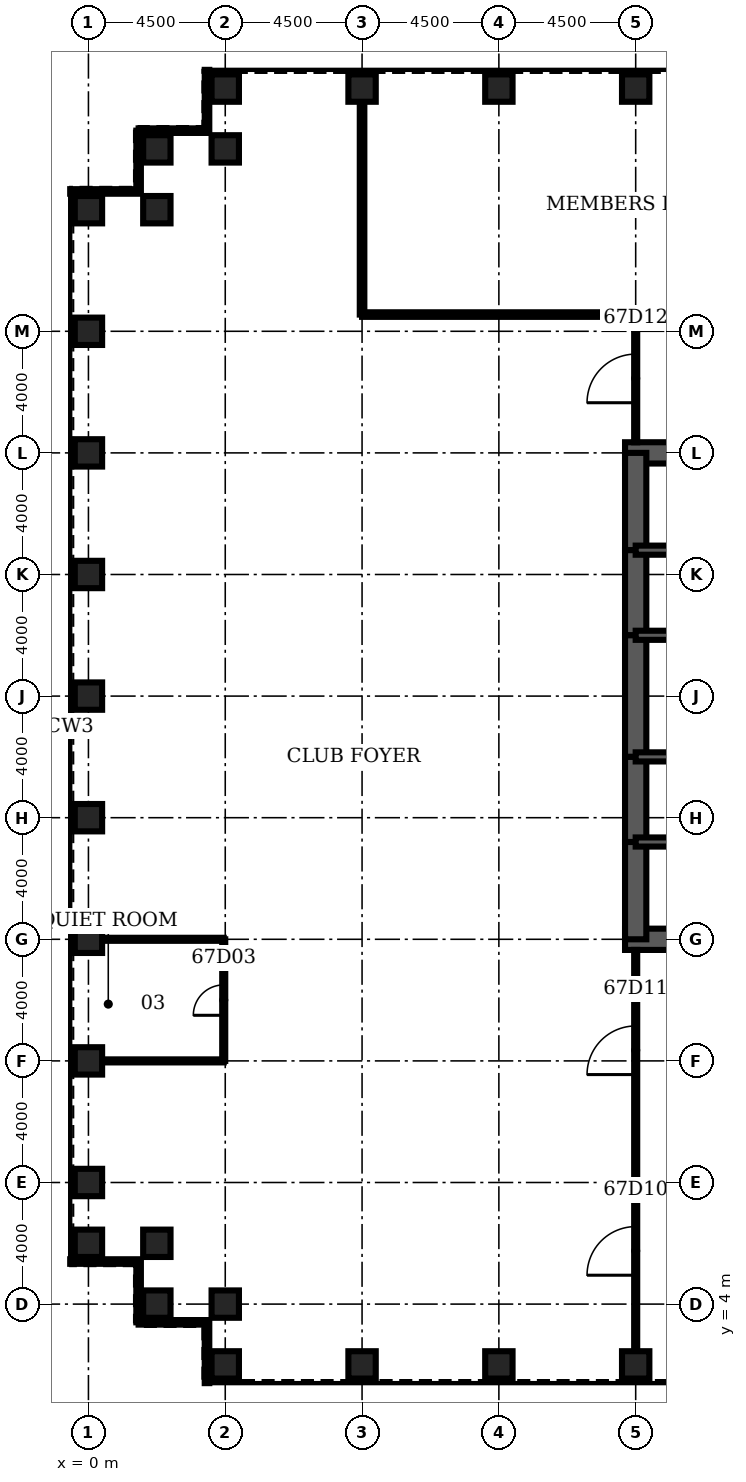
"""IFC4 building model, lengths in metres.
Left out: names, types, materials, properties, quantities, classifications, styles, units other than length and angle.
Written with IfcOpenShell. Run it as: python <this file> out.ifc"""

import sys

from ifc_helpers import new_model, si_unit, direction, frame, frame_2d, origin, origin_2d, place, context, subcontext, project, spatial, rectangle, hollow_rectangle, extrude, element, fill, save


model = new_model("IFC4")
c1 = context("Model", 3, precision=1e-05, world=origin(), true_north=direction((0.0, 1.0)))
c2 = subcontext(c1, "Body", "Model", "MODEL_VIEW")
j1 = project(units=[si_unit("LENGTHUNIT", "METRE"), si_unit("PLANEANGLEUNIT", "RADIAN")], contexts=[c1])
p1 = place(None, origin())
s1 = spatial("IfcSite", under=j1, at=p1, CompositionType="ELEMENT")
p2 = place(p1, origin())
s2 = spatial("IfcBuilding", under=s1, at=p2, CompositionType="ELEMENT")
p3 = place(p2, frame((0.0, 0.0, 296.3)))
s3 = spatial("IfcBuildingStorey", under=s2, at=p3, CompositionType="ELEMENT", Elevation=296.3)
for number, where, z_axis, x_axis in (
    (1, (4.5, 2.0, 0.0), (0.0, 0.0, 1.0), (0.0, 1.0, 0.0)),
    (2, (9.0, 2.0, 0.0), (0.0, 0.0, 1.0), (0.0, 1.0, 0.0)),
    (3, (13.5, 2.0, 0.0), (0.0, 0.0, 1.0), (0.0, 1.0, 0.0)),
    (4, (18.0, 2.0, 0.0), (0.0, 0.0, 1.0), (0.0, 1.0, 0.0)),
    (5, (18.0, 44.0, 0.0), (0.0, 0.0, 1.0), (0.0, 1.0, 0.0)),
    (6, (13.5, 44.0, 0.0), (0.0, 0.0, 1.0), (0.0, 1.0, 0.0)),
    (7, (9.0, 44.0, 0.0), (0.0, 0.0, 1.0), (0.0, 1.0, 0.0)),
    (8, (4.5, 44.0, 0.0), (0.0, 0.0, 1.0), (0.0, 1.0, 0.0)),
    (9, (4.5, 42.0, 0.0), (0.0, 0.0, 1.0), (0.0, 1.0, 0.0)),
    (10, (2.25, 42.0, 0.0), (0.0, 0.0, 1.0), (1.0, 0.0, 0.0)),
    (11, (2.25, 40.0, 0.0), (0.0, 0.0, 1.0), (1.0, 0.0, 0.0)),
    (12, (0.0, 40.0, 0.0), (0.0, 0.0, 1.0), (1.0, 0.0, 0.0)),
    (13, (0.0, 36.0, 0.0), (0.0, 0.0, 1.0), (1.0, 0.0, 0.0)),
    (14, (0.0, 32.0, 0.0), (0.0, 0.0, 1.0), (1.0, 0.0, 0.0)),
    (15, (0.0, 28.0, 0.0), (0.0, 0.0, 1.0), (1.0, 0.0, 0.0)),
    (16, (0.0, 24.0, 0.0), (0.0, 0.0, 1.0), (1.0, 0.0, 0.0)),
    (17, (0.0, 20.0, 0.0), (0.0, 0.0, 1.0), (1.0, 0.0, 0.0)),
    (18, (0.0, 16.0, 0.0), (0.0, 0.0, 1.0), (1.0, 0.0, 0.0)),
    (19, (0.0, 12.0, 0.0), (0.0, 0.0, 1.0), (1.0, 0.0, 0.0)),
    (20, (0.0, 8.0, 0.0), (0.0, 0.0, 1.0), (1.0, 0.0, 0.0)),
    (21, (0.0, 6.0, 0.0), (0.0, 0.0, 1.0), (1.0, 0.0, 0.0)),
    (22, (2.25, 6.0, 0.0), (0.0, 0.0, 1.0), (1.0, 0.0, 0.0)),
    (23, (2.25, 4.0, 0.0), (0.0, 0.0, 1.0), (1.0, 0.0, 0.0)),
    (24, (4.5, 4.0, 0.0), (0.0, 0.0, 1.0), (0.0, 1.0, 0.0)),
):
    element("IfcColumn", number, at=place(p3, frame(where, z_axis=z_axis, x_axis=x_axis)), inside=s3, PredefinedType="COLUMN", context=c2, shape_type="SweptSolid", body=[
        extrude(hollow_rectangle(XDim=0.9, YDim=0.9, WallThickness=0.06, at=origin_2d()), origin(), (0.0, 0.0, 1.0), 4.2),
    ])
for number, where, z_axis, x_axis in (
    (25, (17.65, 16.0, 0.0), (0.0, 0.0, 1.0), (1.0, 0.0, 0.0)),
    (26, (27.0, 32.0, 0.0), (0.0, 0.0, 1.0), (-1.0, 0.0, 0.0)),
):
    element("IfcWall", number, at=place(p3, frame(where, z_axis=z_axis, x_axis=x_axis)), inside=s3, PredefinedType="SHEAR", context=c2, shape_type="SweptSolid", body=[
        extrude(rectangle(XDim=9.35, YDim=0.7, at=frame_2d((4.675, 0.0))), origin(), (0.0, 0.0, 1.0), 4.2),
    ])
p4 = place(p3, frame((18.0, 32.0, 0.0), z_axis=(0.0, 0.0, 1.0), x_axis=(0.0, -1.0, 0.0)))
e27 = element("IfcWall", 27, at=p4, inside=s3, PredefinedType="SHEAR", context=c2, shape_type="SweptSolid", body=[
    extrude(rectangle(XDim=3.2, YDim=0.7, at=frame_2d((1.6, 0.0))), origin(), (0.0, 0.0, 1.0), 4.2),
])
p5 = place(p3, frame((18.0, 28.8, 0.0), z_axis=(0.0, 0.0, 1.0), x_axis=(0.0, -1.0, 0.0)))
e28 = element("IfcWall", 28, at=p5, inside=s3, PredefinedType="SHEAR", context=c2, shape_type="SweptSolid", body=[
    extrude(rectangle(XDim=2.8, YDim=0.7, at=frame_2d((1.4, 0.0))), origin(), (0.0, 0.0, 1.0), 4.2),
])
p6 = place(p5, frame((0.4, 0.0, 0.0)))
e29 = element("IfcOpeningElement", 29, at=p6, cuts=e28, PredefinedType="OPENING", context=c2, shape_type="SweptSolid", body=[
    extrude(rectangle(XDim=1.8, YDim=2.1, at=frame_2d((0.9, 1.05))), frame((0.0, 0.36, 0.0), z_axis=(0.0, -1.0, 0.0), x_axis=(1.0, 0.0, 0.0)), (0.0, 0.0, 1.0), 0.72),
])
p7 = place(p3, frame((18.0, 26.0, 0.0), z_axis=(0.0, 0.0, 1.0), x_axis=(0.0, -1.0, 0.0)))
e30 = element("IfcWall", 30, at=p7, inside=s3, PredefinedType="SHEAR", context=c2, shape_type="SweptSolid", body=[
    extrude(rectangle(XDim=4.0, YDim=0.7, at=frame_2d((2.0, 0.0))), origin(), (0.0, 0.0, 1.0), 4.2),
])
p8 = place(p3, frame((18.0, 22.0, 0.0), z_axis=(0.0, 0.0, 1.0), x_axis=(0.0, -1.0, 0.0)))
e31 = element("IfcWall", 31, at=p8, inside=s3, PredefinedType="SHEAR", context=c2, shape_type="SweptSolid", body=[
    extrude(rectangle(XDim=2.8, YDim=0.7, at=frame_2d((1.4, 0.0))), origin(), (0.0, 0.0, 1.0), 4.2),
])
p9 = place(p8, frame((0.6, 0.0, 0.0)))
e32 = element("IfcOpeningElement", 32, at=p9, cuts=e31, PredefinedType="OPENING", context=c2, shape_type="SweptSolid", body=[
    extrude(rectangle(XDim=1.8, YDim=2.1, at=frame_2d((0.9, 1.05))), frame((0.0, 0.36, 0.0), z_axis=(0.0, -1.0, 0.0), x_axis=(1.0, 0.0, 0.0)), (0.0, 0.0, 1.0), 0.72),
])
p10 = place(p3, frame((18.0, 19.2, 0.0), z_axis=(0.0, 0.0, 1.0), x_axis=(0.0, -1.0, 0.0)))
e33 = element("IfcWall", 33, at=p10, inside=s3, PredefinedType="SHEAR", context=c2, shape_type="SweptSolid", body=[
    extrude(rectangle(XDim=3.2, YDim=0.7, at=frame_2d((1.6, 0.0))), origin(), (0.0, 0.0, 1.0), 4.2),
])
p11 = place(p3, frame((18.0, 19.2, 0.0), z_axis=(0.0, 0.0, 1.0), x_axis=(1.0, 0.0, 0.0)))
e34 = element("IfcWall", 34, at=p11, inside=s3, PredefinedType="SOLIDWALL", context=c2, shape_type="SweptSolid", body=[
    extrude(rectangle(XDim=9.0, YDim=0.3, at=frame_2d((4.5, 0.0))), origin(), (0.0, 0.0, 1.0), 4.2),
])
p12 = place(p11, frame((0.65, 0.0, 0.0)))
e35 = element("IfcOpeningElement", 35, at=p12, cuts=e34, PredefinedType="OPENING", context=c2, shape_type="SweptSolid", body=[
    extrude(rectangle(XDim=1.0, YDim=2.1, at=frame_2d((0.5, 1.05))), frame((0.0, 0.16, 0.0), z_axis=(0.0, -1.0, 0.0), x_axis=(1.0, 0.0, 0.0)), (0.0, 0.0, 1.0), 0.32),
])
p13 = place(p3, frame((18.0, 28.8, 0.0), z_axis=(0.0, 0.0, 1.0), x_axis=(1.0, 0.0, 0.0)))
e36 = element("IfcWall", 36, at=p13, inside=s3, PredefinedType="SOLIDWALL", context=c2, shape_type="SweptSolid", body=[
    extrude(rectangle(XDim=9.0, YDim=0.3, at=frame_2d((4.5, 0.0))), origin(), (0.0, 0.0, 1.0), 4.2),
])
p14 = place(p13, frame((0.65, 0.0, 0.0)))
e37 = element("IfcOpeningElement", 37, at=p14, cuts=e36, PredefinedType="OPENING", context=c2, shape_type="SweptSolid", body=[
    extrude(rectangle(XDim=1.0, YDim=2.1, at=frame_2d((0.5, 1.05))), frame((0.0, 0.16, 0.0), z_axis=(0.0, -1.0, 0.0), x_axis=(1.0, 0.0, 0.0)), (0.0, 0.0, 1.0), 0.32),
])
p15 = place(p3, frame((18.0, 22.0, 0.0), z_axis=(0.0, 0.0, 1.0), x_axis=(1.0, 0.0, 0.0)))
e38 = element("IfcWall", 38, at=p15, inside=s3, PredefinedType="SOLIDWALL", context=c2, shape_type="SweptSolid", body=[
    extrude(rectangle(XDim=6.0, YDim=0.3, at=frame_2d((3.0, 0.0))), origin(), (0.0, 0.0, 1.0), 4.2),
])
p16 = place(p15, frame((4.4, 0.0, 0.0)))
e39 = element("IfcOpeningElement", 39, at=p16, cuts=e38, PredefinedType="OPENING", context=c2, shape_type="SweptSolid", body=[
    extrude(rectangle(XDim=1.0, YDim=2.1, at=frame_2d((0.5, 1.05))), frame((0.0, 0.16, 0.0), z_axis=(0.0, -1.0, 0.0), x_axis=(1.0, 0.0, 0.0)), (0.0, 0.0, 1.0), 0.32),
])
p17 = place(p15, frame((0.6, 0.0, 0.0)))
e40 = element("IfcOpeningElement", 40, at=p17, cuts=e38, PredefinedType="OPENING", context=c2, shape_type="SweptSolid", body=[
    extrude(rectangle(XDim=1.0, YDim=2.1, at=frame_2d((0.5, 1.05))), frame((0.0, 0.16, 0.0), z_axis=(0.0, -1.0, 0.0), x_axis=(1.0, 0.0, 0.0)), (0.0, 0.0, 1.0), 0.32),
])
p18 = place(p3, frame((18.0, 26.0, 0.0), z_axis=(0.0, 0.0, 1.0), x_axis=(1.0, 0.0, 0.0)))
e41 = element("IfcWall", 41, at=p18, inside=s3, PredefinedType="SOLIDWALL", context=c2, shape_type="SweptSolid", body=[
    extrude(rectangle(XDim=6.0, YDim=0.3, at=frame_2d((3.0, 0.0))), origin(), (0.0, 0.0, 1.0), 4.2),
])
for number, where, z_axis, x_axis in (
    (42, (0.45, 12.0, 0.0), (0.0, 0.0, 1.0), (1.0, 0.0, 0.0)),
    (43, (0.45, 16.0, 0.0), (0.0, 0.0, 1.0), (1.0, 0.0, 0.0)),
):
    element("IfcWall", number, at=place(p3, frame(where, z_axis=z_axis, x_axis=x_axis)), inside=s3, PredefinedType="PARTITIONING", context=c2, shape_type="SweptSolid", body=[
        extrude(rectangle(XDim=4.0, YDim=0.1, at=frame_2d((2.0, 0.0))), origin(), (0.0, 0.0, 1.0), 3.0),
    ])
p19 = place(p3, frame((9.0, 36.55, 0.0), z_axis=(0.0, 0.0, 1.0), x_axis=(1.0, 0.0, 0.0)))
e44 = element("IfcWall", 44, at=p19, inside=s3, PredefinedType="PARTITIONING", context=c2, shape_type="SweptSolid", body=[
    extrude(rectangle(XDim=22.5, YDim=0.15, at=frame_2d((11.25, 0.0))), origin(), (0.0, 0.0, 1.0), 3.0),
])
p20 = place(p19, frame((10.45, 0.0, 0.0)))
e45 = element("IfcOpeningElement", 45, at=p20, cuts=e44, PredefinedType="OPENING", context=c2, shape_type="SweptSolid", body=[
    extrude(rectangle(XDim=1.6, YDim=2.1, at=frame_2d((0.8, 1.05))), frame((0.0, 0.085, 0.0), z_axis=(0.0, -1.0, 0.0), x_axis=(1.0, 0.0, 0.0)), (0.0, 0.0, 1.0), 0.17),
])
p21 = place(p3, frame((4.45, 12.0, 0.0), z_axis=(0.0, 0.0, 1.0), x_axis=(0.0, 1.0, 0.0)))
e46 = element("IfcWall", 46, at=p21, inside=s3, PredefinedType="PARTITIONING", context=c2, shape_type="SweptSolid", body=[
    extrude(rectangle(XDim=4.0, YDim=0.1, at=frame_2d((2.0, 0.0))), origin(), (0.0, 0.0, 1.0), 3.0),
])
p22 = place(p21, frame((1.5, 0.0, 0.0)))
e47 = element("IfcOpeningElement", 47, at=p22, cuts=e46, PredefinedType="OPENING", context=c2, shape_type="SweptSolid", body=[
    extrude(rectangle(XDim=1.0, YDim=2.1, at=frame_2d((0.5, 1.05))), frame((0.0, 0.06, 0.0), z_axis=(0.0, -1.0, 0.0), x_axis=(1.0, 0.0, 0.0)), (0.0, 0.0, 1.0), 0.12),
])
p23 = place(p3, frame((9.0, 36.55, 0.0), z_axis=(0.0, 0.0, 1.0), x_axis=(0.0, 1.0, 0.0)))
e48 = element("IfcWall", 48, at=p23, inside=s3, PredefinedType="PARTITIONING", context=c2, shape_type="SweptSolid", body=[
    extrude(rectangle(XDim=7.0, YDim=0.15, at=frame_2d((3.5, 0.0))), origin(), (0.0, 0.0, 1.0), 3.0),
])
p24 = place(p3, frame((18.0, 2.45, 0.0), z_axis=(0.0, 0.0, 1.0), x_axis=(0.0, 1.0, 0.0)))
e49 = element("IfcWall", 49, at=p24, inside=s3, PredefinedType="PARTITIONING", context=c2, shape_type="SweptSolid", body=[
    extrude(rectangle(XDim=13.2, YDim=0.1, at=frame_2d((6.6, 0.0))), origin(), (0.0, 0.0, 1.0), 3.0),
])
p25 = place(p24, frame((2.5, 0.0, 0.0)))
e50 = element("IfcOpeningElement", 50, at=p25, cuts=e49, PredefinedType="OPENING", context=c2, shape_type="SweptSolid", body=[
    extrude(rectangle(XDim=1.6, YDim=2.1, at=frame_2d((0.8, 1.05))), frame((0.0, 0.06, 0.0), z_axis=(0.0, -1.0, 0.0), x_axis=(1.0, 0.0, 0.0)), (0.0, 0.0, 1.0), 0.12),
])
p26 = place(p24, frame((9.1, 0.0, 0.0)))
e51 = element("IfcOpeningElement", 51, at=p26, cuts=e49, PredefinedType="OPENING", context=c2, shape_type="SweptSolid", body=[
    extrude(rectangle(XDim=1.6, YDim=2.1, at=frame_2d((0.8, 1.05))), frame((0.0, 0.06, 0.0), z_axis=(0.0, -1.0, 0.0), x_axis=(1.0, 0.0, 0.0)), (0.0, 0.0, 1.0), 0.12),
])
p27 = place(p3, frame((18.0, 32.35, 0.0), z_axis=(0.0, 0.0, 1.0), x_axis=(0.0, 1.0, 0.0)))
e52 = element("IfcWall", 52, at=p27, inside=s3, PredefinedType="PARTITIONING", context=c2, shape_type="SweptSolid", body=[
    extrude(rectangle(XDim=4.2, YDim=0.1, at=frame_2d((2.1, 0.0))), origin(), (0.0, 0.0, 1.0), 3.0),
])
p28 = place(p27, frame((1.3, 0.0, 0.0)))
e53 = element("IfcOpeningElement", 53, at=p28, cuts=e52, PredefinedType="OPENING", context=c2, shape_type="SweptSolid", body=[
    extrude(rectangle(XDim=1.6, YDim=2.1, at=frame_2d((0.8, 1.05))), frame((0.0, 0.06, 0.0), z_axis=(0.0, -1.0, 0.0), x_axis=(1.0, 0.0, 0.0)), (0.0, 0.0, 1.0), 0.12),
])
p29 = place(p3, frame((3.9, 44.6, 0.0), z_axis=(0.0, 0.0, 1.0), x_axis=(0.0, -1.0, 0.0)))
e54 = element("IfcWall", 54, at=p29, inside=s3, PredefinedType="ELEMENTEDWALL", context=c2, shape_type="SweptSolid", body=[
    extrude(rectangle(XDim=2.0, YDim=0.15, at=frame_2d((1.0, 0.0))), origin(), (0.0, 0.0, 1.0), 4.04),
])
p30 = place(p3, frame((3.9, 42.6, 0.0), z_axis=(0.0, 0.0, 1.0), x_axis=(-1.0, 0.0, 0.0)))
e55 = element("IfcWall", 55, at=p30, inside=s3, PredefinedType="ELEMENTEDWALL", context=c2, shape_type="SweptSolid", body=[
    extrude(rectangle(XDim=2.25, YDim=0.15, at=frame_2d((1.125, 0.0))), origin(), (0.0, 0.0, 1.0), 4.04),
])
p31 = place(p3, frame((1.65, 42.6, 0.0), z_axis=(0.0, 0.0, 1.0), x_axis=(0.0, -1.0, 0.0)))
e56 = element("IfcWall", 56, at=p31, inside=s3, PredefinedType="ELEMENTEDWALL", context=c2, shape_type="SweptSolid", body=[
    extrude(rectangle(XDim=2.0, YDim=0.15, at=frame_2d((1.0, 0.0))), origin(), (0.0, 0.0, 1.0), 4.04),
])
for number, where, z_axis, x_axis in (
    (57, (1.65, 40.6, 0.0), (0.0, 0.0, 1.0), (-1.0, 0.0, 0.0)),
    (58, (-0.6, 5.4, 0.0), (0.0, 0.0, 1.0), (1.0, 0.0, 0.0)),
):
    element("IfcWall", number, at=place(p3, frame(where, z_axis=z_axis, x_axis=x_axis)), inside=s3, PredefinedType="ELEMENTEDWALL", context=c2, shape_type="SweptSolid", body=[
        extrude(rectangle(XDim=2.25, YDim=0.15, at=frame_2d((1.125, 0.0))), origin(), (0.0, 0.0, 1.0), 4.04),
    ])
p32 = place(p3, frame((1.65, 5.4, 0.0), z_axis=(0.0, 0.0, 1.0), x_axis=(0.0, -1.0, 0.0)))
e59 = element("IfcWall", 59, at=p32, inside=s3, PredefinedType="ELEMENTEDWALL", context=c2, shape_type="SweptSolid", body=[
    extrude(rectangle(XDim=2.0, YDim=0.15, at=frame_2d((1.0, 0.0))), origin(), (0.0, 0.0, 1.0), 4.04),
])
p33 = place(p3, frame((1.65, 3.4, 0.0), z_axis=(0.0, 0.0, 1.0), x_axis=(1.0, 0.0, 0.0)))
e60 = element("IfcWall", 60, at=p33, inside=s3, PredefinedType="ELEMENTEDWALL", context=c2, shape_type="SweptSolid", body=[
    extrude(rectangle(XDim=2.25, YDim=0.15, at=frame_2d((1.125, 0.0))), origin(), (0.0, 0.0, 1.0), 4.04),
])
p34 = place(p3, frame((3.9, 3.4, 0.0), z_axis=(0.0, 0.0, 1.0), x_axis=(0.0, -1.0, 0.0)))
e61 = element("IfcWall", 61, at=p34, inside=s3, PredefinedType="ELEMENTEDWALL", context=c2, shape_type="SweptSolid", body=[
    extrude(rectangle(XDim=2.0, YDim=0.15, at=frame_2d((1.0, 0.0))), origin(), (0.0, 0.0, 1.0), 4.04),
])
p35 = place(p22, origin())
e62 = element("IfcDoor", 62, at=p35, inside=s3, OperationType="SINGLE_SWING_LEFT", PredefinedType="DOOR", context=c2, shape_type="SweptSolid", body=[
    extrude(rectangle(XDim=1.0, YDim=2.1, at=frame_2d((0.5, 1.05))), frame((0.0, 0.025, 0.0), z_axis=(0.0, -1.0, 0.0), x_axis=(1.0, 0.0, 0.0)), (0.0, 0.0, 1.0), 0.05),
])
fill(e47, e62)
p36 = place(p25, origin())
e63 = element("IfcDoor", 63, at=p36, inside=s3, OperationType="SINGLE_SWING_LEFT", PredefinedType="DOOR", context=c2, shape_type="SweptSolid", body=[
    extrude(rectangle(XDim=1.6, YDim=2.1, at=frame_2d((0.8, 1.05))), frame((0.0, 0.025, 0.0), z_axis=(0.0, -1.0, 0.0), x_axis=(1.0, 0.0, 0.0)), (0.0, 0.0, 1.0), 0.05),
])
fill(e50, e63)
p37 = place(p26, origin())
e64 = element("IfcDoor", 64, at=p37, inside=s3, OperationType="SINGLE_SWING_LEFT", PredefinedType="DOOR", context=c2, shape_type="SweptSolid", body=[
    extrude(rectangle(XDim=1.6, YDim=2.1, at=frame_2d((0.8, 1.05))), frame((0.0, 0.025, 0.0), z_axis=(0.0, -1.0, 0.0), x_axis=(1.0, 0.0, 0.0)), (0.0, 0.0, 1.0), 0.05),
])
fill(e51, e64)
p38 = place(p28, origin())
e65 = element("IfcDoor", 65, at=p38, inside=s3, OperationType="SINGLE_SWING_LEFT", PredefinedType="DOOR", context=c2, shape_type="SweptSolid", body=[
    extrude(rectangle(XDim=1.6, YDim=2.1, at=frame_2d((0.8, 1.05))), frame((0.0, 0.025, 0.0), z_axis=(0.0, -1.0, 0.0), x_axis=(1.0, 0.0, 0.0)), (0.0, 0.0, 1.0), 0.05),
])
fill(e53, e65)
p39 = place(p12, origin())
e66 = element("IfcDoor", 66, at=p39, inside=s3, OperationType="SINGLE_SWING_LEFT", PredefinedType="DOOR", context=c2, shape_type="SweptSolid", body=[
    extrude(rectangle(XDim=1.0, YDim=2.1, at=frame_2d((0.5, 1.05))), frame((0.0, 0.025, 0.0), z_axis=(0.0, -1.0, 0.0), x_axis=(1.0, 0.0, 0.0)), (0.0, 0.0, 1.0), 0.05),
])
fill(e35, e66)
p40 = place(p14, origin())
e67 = element("IfcDoor", 67, at=p40, inside=s3, OperationType="SINGLE_SWING_LEFT", PredefinedType="DOOR", context=c2, shape_type="SweptSolid", body=[
    extrude(rectangle(XDim=1.0, YDim=2.1, at=frame_2d((0.5, 1.05))), frame((0.0, 0.025, 0.0), z_axis=(0.0, -1.0, 0.0), x_axis=(1.0, 0.0, 0.0)), (0.0, 0.0, 1.0), 0.05),
])
fill(e37, e67)
p41 = place(p9, origin())
e68 = element("IfcDoor", 68, at=p41, inside=s3, OperationType="SINGLE_SWING_LEFT", PredefinedType="DOOR", context=c2, shape_type="SweptSolid", body=[
    extrude(rectangle(XDim=1.8, YDim=2.1, at=frame_2d((0.9, 1.05))), frame((0.0, 0.35, 0.0), z_axis=(0.0, -1.0, 0.0), x_axis=(1.0, 0.0, 0.0)), (0.0, 0.0, 1.0), 0.699),
])
fill(e32, e68)
p42 = place(p6, origin())
e69 = element("IfcDoor", 69, at=p42, inside=s3, OperationType="SINGLE_SWING_LEFT", PredefinedType="DOOR", context=c2, shape_type="SweptSolid", body=[
    extrude(rectangle(XDim=1.8, YDim=2.1, at=frame_2d((0.9, 1.05))), frame((0.0, 0.35, 0.0), z_axis=(0.0, -1.0, 0.0), x_axis=(1.0, 0.0, 0.0)), (0.0, 0.0, 1.0), 0.699),
])
fill(e29, e69)
p43 = place(p17, origin())
e70 = element("IfcDoor", 70, at=p43, inside=s3, OperationType="SINGLE_SWING_LEFT", PredefinedType="DOOR", context=c2, shape_type="SweptSolid", body=[
    extrude(rectangle(XDim=1.0, YDim=2.1, at=frame_2d((0.5, 1.05))), frame((0.0, 0.025, 0.0), z_axis=(0.0, -1.0, 0.0), x_axis=(1.0, 0.0, 0.0)), (0.0, 0.0, 1.0), 0.05),
])
fill(e40, e70)
save(model, sys.argv[1])
